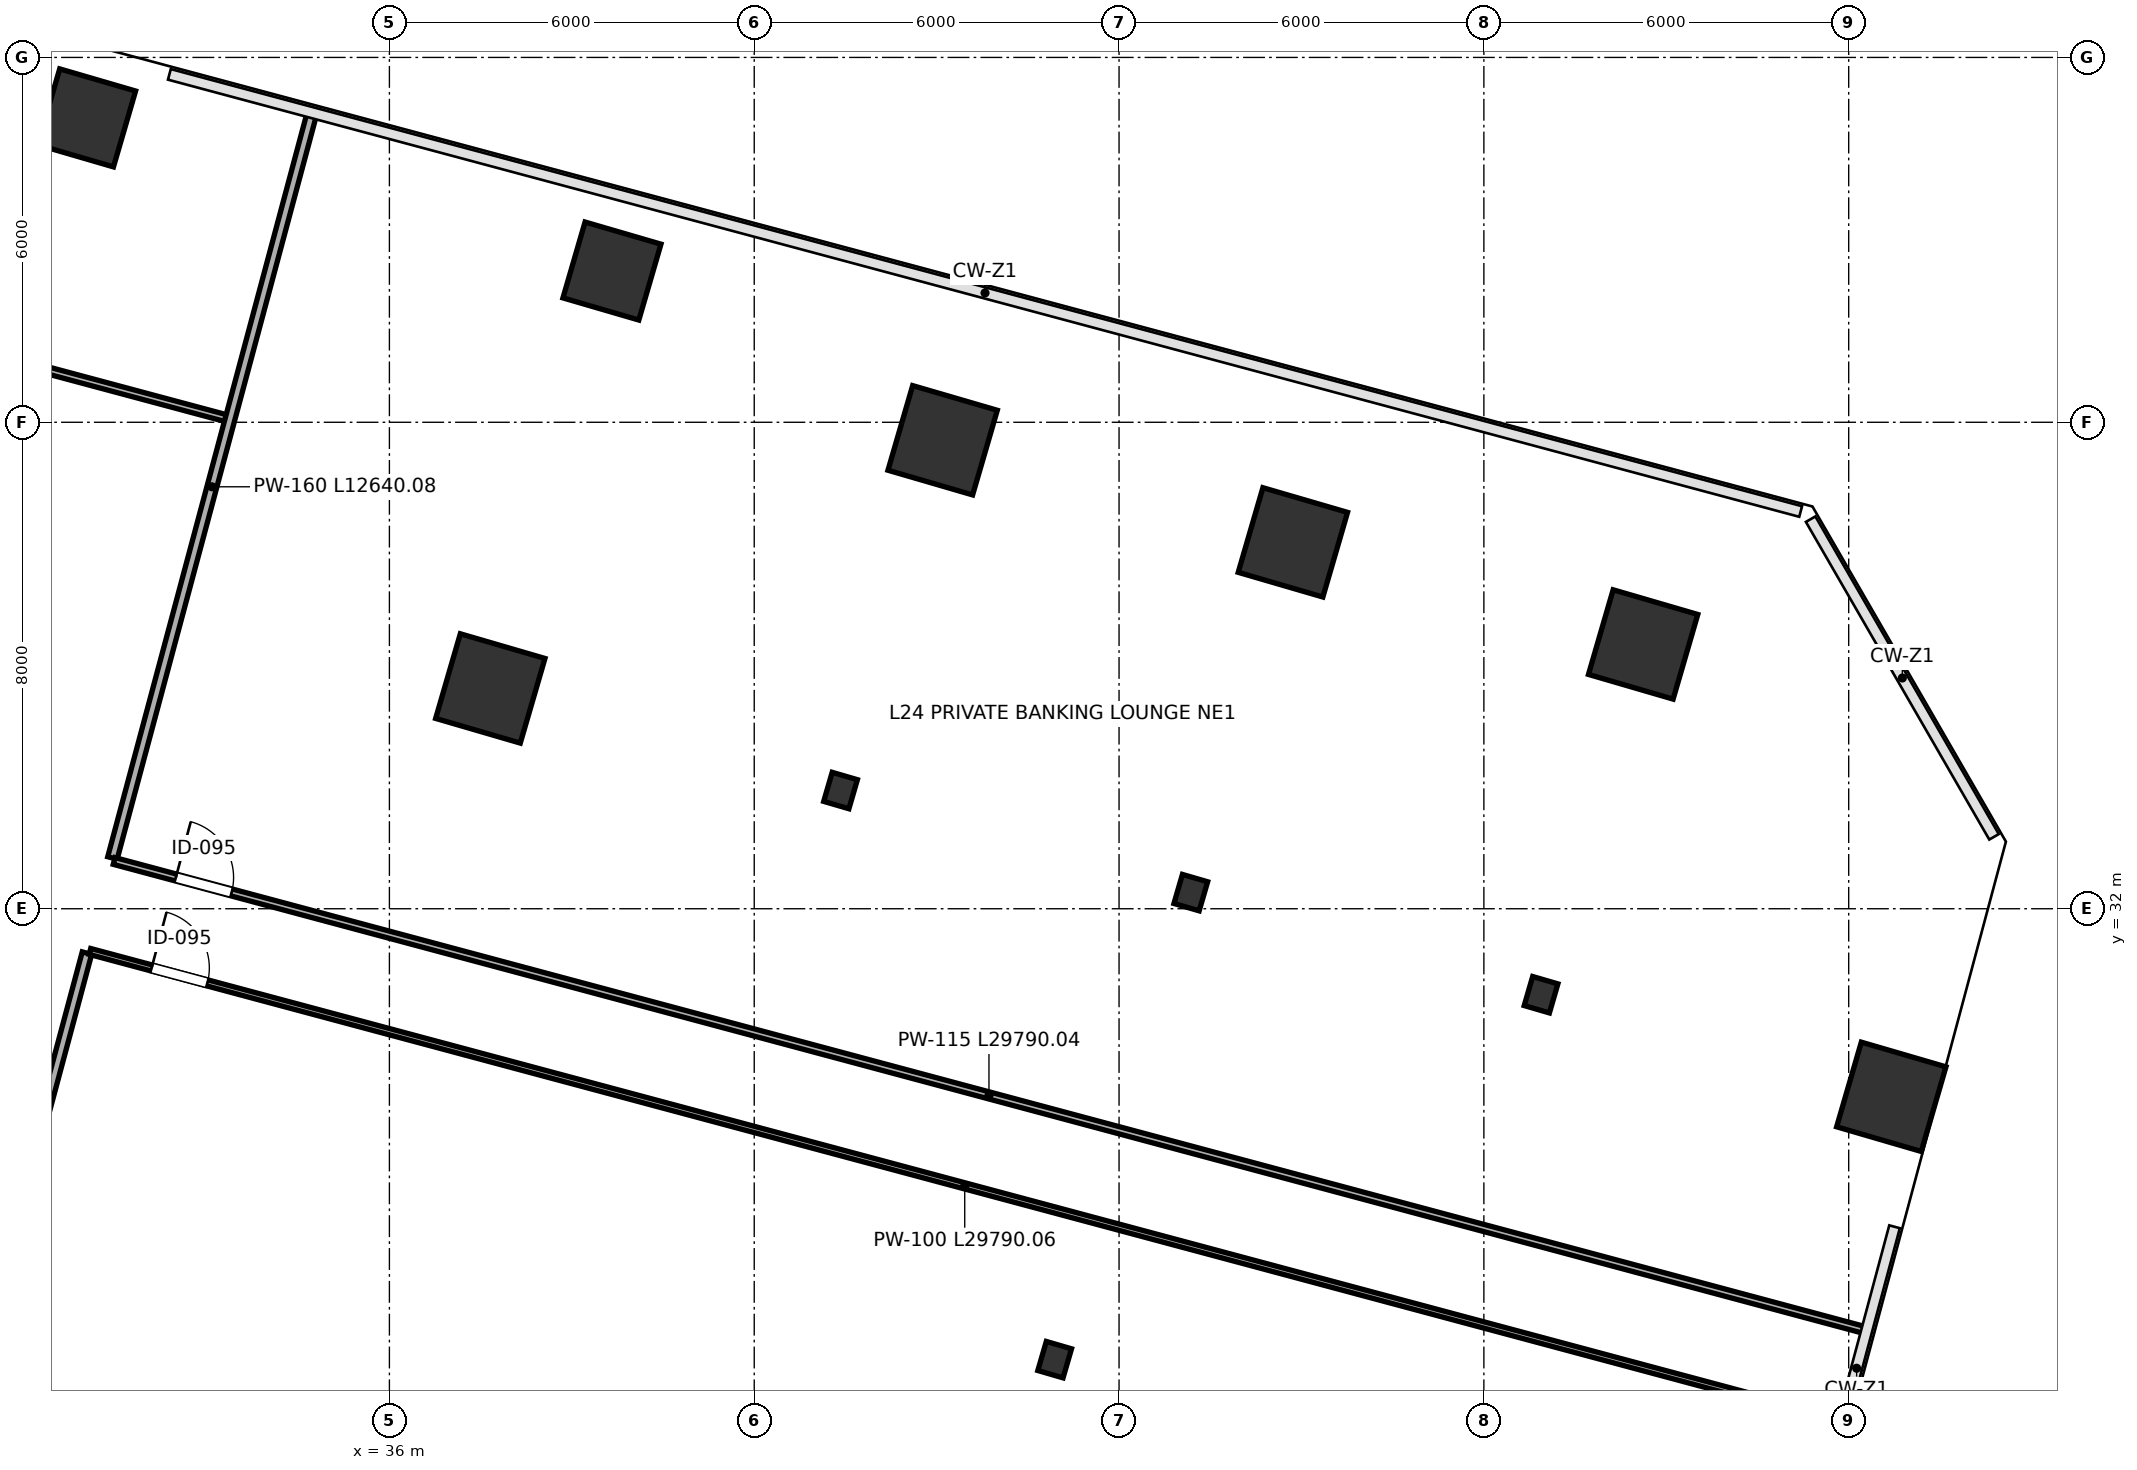
"""IFC4 building model, lengths in metres.
Left out: names, types, materials, properties, quantities, classifications, styles, units other than length and angle.
Written with IfcOpenShell. Run it as: python <this file> out.ifc"""

import sys

from ifc_helpers import new_model, si_unit, direction, frame, frame_2d, origin, origin_2d, place, context, subcontext, project, spatial, rectangle, i_section, extrude, clip, halfspace, source, transform, mapped, element, fill, save


model = new_model("IFC4")
c1 = context("Model", 3, precision=1e-05, world=origin(), true_north=direction((0.0, 1.0)))
c2 = subcontext(c1, "Body", "Model", "MODEL_VIEW")
j1 = project(units=[si_unit("LENGTHUNIT", "METRE"), si_unit("PLANEANGLEUNIT", "RADIAN")], contexts=[c1])
p1 = place(None, origin())
s1 = spatial("IfcSite", under=j1, at=p1, CompositionType="ELEMENT")
p2 = place(p1, origin())
s2 = spatial("IfcBuilding", under=s1, at=p2, CompositionType="ELEMENT")
p3 = place(p2, frame((0.0, 0.0, 108.4)))
s3 = spatial("IfcBuildingStorey", under=s2, at=p3, CompositionType="ELEMENT", Elevation=108.4)
p4 = place(p3, frame((31.02, 45.006, 0.0), z_axis=(0.066728027674, -0.04998809712, 0.996518218835), x_axis=(-0.798779681404, -0.601171101376, 0.023330826115)))
e1 = element("IfcColumn", 1, at=p4, inside=s3, PredefinedType="COLUMN", context=c2, shape_type="Clipping", body=[
    clip(clip(extrude(rectangle(XDim=1.3, YDim=1.3, at=origin_2d()), origin(), (0.0, 0.0, 1.0), 4.215), halfspace(frame((0.0, 0.0, 0.068), z_axis=(0.0, 0.0, -1.0), x_axis=(1.0, 0.0, 0.0)), False)), halfspace(frame((0.0, 0.0, 4.147), z_axis=(0.0, 0.0, 1.0), x_axis=(1.0, 0.0, 0.0)), False)),
])
p5 = place(p3, frame((37.659, 35.623, 0.0), z_axis=(0.017836984974, -0.083799082003, 0.996323017812), x_axis=(-0.997057033724, 0.072818152452, 0.02397474035)))
e2 = element("IfcColumn", 2, at=p5, inside=s3, PredefinedType="COLUMN", context=c2, shape_type="Clipping", body=[
    clip(clip(extrude(rectangle(XDim=1.45, YDim=1.45, at=origin_2d()), origin(), (0.0, 0.0, 1.0), 4.216), halfspace(frame((0.0, 0.0, 0.078), z_axis=(0.0, 0.0, -1.0), x_axis=(1.0, 0.0, 0.0)), False)), halfspace(frame((0.0, 0.0, 4.137), z_axis=(0.0, 0.0, 1.0), x_axis=(1.0, 0.0, 0.0)), False)),
])
p6 = place(p3, frame((39.66, 42.487, 0.0), z_axis=(0.053103747576, -0.094361719033, 0.994120645583), x_axis=(-0.973092241165, -0.228415060183, 0.030299347614)))
e3 = element("IfcColumn", 3, at=p6, inside=s3, PredefinedType="COLUMN", context=c2, shape_type="Clipping", body=[
    clip(clip(extrude(rectangle(XDim=1.3, YDim=1.3, at=origin_2d()), origin(), (0.0, 0.0, 1.0), 4.225), halfspace(frame((0.0, 0.0, 0.089), z_axis=(0.0, 0.0, -1.0), x_axis=(1.0, 0.0, 0.0)), False)), halfspace(frame((0.0, 0.0, 4.136), z_axis=(0.0, 0.0, 1.0), x_axis=(1.0, 0.0, 0.0)), False)),
])
p7 = place(p3, frame((43.42, 33.944, 0.0), z_axis=(0.008778031261, -0.113190403109, 0.993534538308), x_axis=(-0.978672038905, 0.20295754962, 0.031769062263)))
e4 = element("IfcColumn", 4, at=p7, inside=s3, PredefinedType="COLUMN", context=c2, shape_type="Clipping", body=[
    clip(clip(extrude(i_section(OverallWidth=0.432, OverallDepth=0.498, WebThickness=0.056, FlangeThickness=0.089, FilletRadius=0.015, at=origin_2d()), origin(), (0.0, 0.0, 1.0), 4.228), halfspace(frame((0.0, 0.0, 0.035), z_axis=(0.0, 0.0, -1.0), x_axis=(1.0, 0.0, 0.0)), False)), halfspace(frame((0.0, 0.0, 4.193), z_axis=(0.0, 0.0, 1.0), x_axis=(1.0, 0.0, 0.0)), False)),
])
p8 = place(p3, frame((45.099, 39.704, 0.0), z_axis=(0.038336503657, -0.121985025172, 0.991791291614), x_axis=(-0.999093281431, -0.023072438449, 0.035780966775)))
e5 = element("IfcColumn", 5, at=p8, inside=s3, PredefinedType="COLUMN", context=c2, shape_type="Clipping", body=[
    clip(clip(extrude(rectangle(XDim=1.45, YDim=1.45, at=origin_2d()), origin(), (0.0, 0.0, 1.0), 4.235), halfspace(frame((0.0, 0.0, 0.117), z_axis=(0.0, 0.0, -1.0), x_axis=(1.0, 0.0, 0.0)), False)), halfspace(frame((0.0, 0.0, 4.118), z_axis=(0.0, 0.0, 1.0), x_axis=(1.0, 0.0, 0.0)), False)),
])
p9 = place(p3, frame((46.941, 24.584, 0.0), z_axis=(-0.039617133974, -0.130483176723, 0.990658681529), x_axis=(-0.83810363037, 0.54417479474, 0.038158846035)))
e6 = element("IfcColumn", 6, at=p9, inside=s3, PredefinedType="COLUMN", context=c2, shape_type="Clipping", body=[
    clip(clip(extrude(i_section(OverallWidth=0.432, OverallDepth=0.498, WebThickness=0.056, FlangeThickness=0.089, FilletRadius=0.015, at=origin_2d()), origin(), (0.0, 0.0, 1.0), 4.24), halfspace(frame((0.0, 0.0, 0.042), z_axis=(0.0, 0.0, -1.0), x_axis=(1.0, 0.0, 0.0)), False)), halfspace(frame((0.0, 0.0, 4.198), z_axis=(0.0, 0.0, 1.0), x_axis=(1.0, 0.0, 0.0)), False)),
])
p10 = place(p3, frame((49.18, 32.265, 0.0), z_axis=(-0.000172602513, -0.142339538659, 0.989817875138), x_axis=(-0.959713280046, 0.278143722739, 0.039830762045)))
e7 = element("IfcColumn", 7, at=p10, inside=s3, PredefinedType="COLUMN", context=c2, shape_type="Clipping", body=[
    clip(clip(extrude(i_section(OverallWidth=0.432, OverallDepth=0.498, WebThickness=0.056, FlangeThickness=0.089, FilletRadius=0.015, at=origin_2d()), origin(), (0.0, 0.0, 1.0), 4.243), halfspace(frame((0.0, 0.0, 0.044), z_axis=(0.0, 0.0, -1.0), x_axis=(1.0, 0.0, 0.0)), False)), halfspace(frame((0.0, 0.0, 4.2), z_axis=(0.0, 0.0, 1.0), x_axis=(1.0, 0.0, 0.0)), False)),
])
p11 = place(p3, frame((50.859, 38.025, 0.0), z_axis=(0.029291516065, -0.150994893597, 0.988100475253), x_axis=(-0.995136317919, 0.088607162104, 0.043040441253)))
e8 = element("IfcColumn", 8, at=p11, inside=s3, PredefinedType="COLUMN", context=c2, shape_type="Clipping", body=[
    clip(clip(extrude(rectangle(XDim=1.45, YDim=1.45, at=origin_2d()), origin(), (0.0, 0.0, 1.0), 4.251), halfspace(frame((0.0, 0.0, 0.141), z_axis=(0.0, 0.0, -1.0), x_axis=(1.0, 0.0, 0.0)), False)), halfspace(frame((0.0, 0.0, 4.11), z_axis=(0.0, 0.0, 1.0), x_axis=(1.0, 0.0, 0.0)), False)),
])
p12 = place(p3, frame((54.94, 30.586, 0.0), z_axis=(-0.009105432119, -0.171056136735, 0.9852192087), x_axis=(-0.94403801502, 0.326335004431, 0.047934237029)))
e9 = element("IfcColumn", 9, at=p12, inside=s3, PredefinedType="COLUMN", context=c2, shape_type="Clipping", body=[
    clip(clip(extrude(i_section(OverallWidth=0.432, OverallDepth=0.498, WebThickness=0.056, FlangeThickness=0.089, FilletRadius=0.015, at=origin_2d()), origin(), (0.0, 0.0, 1.0), 4.263), halfspace(frame((0.0, 0.0, 0.053), z_axis=(0.0, 0.0, -1.0), x_axis=(1.0, 0.0, 0.0)), False)), halfspace(frame((0.0, 0.0, 4.21), z_axis=(0.0, 0.0, 1.0), x_axis=(1.0, 0.0, 0.0)), False)),
])
p13 = place(p3, frame((56.619, 36.346, 0.0), z_axis=(0.020294801599, -0.179623286263, 0.983526103395), x_axis=(-0.98487919122, 0.165693320666, 0.050583615811)))
e10 = element("IfcColumn", 10, at=p13, inside=s3, PredefinedType="COLUMN", context=c2, shape_type="Clipping", body=[
    clip(clip(extrude(rectangle(XDim=1.45, YDim=1.45, at=origin_2d()), origin(), (0.0, 0.0, 1.0), 4.271), halfspace(frame((0.0, 0.0, 0.166), z_axis=(0.0, 0.0, -1.0), x_axis=(1.0, 0.0, 0.0)), False)), halfspace(frame((0.0, 0.0, 4.104), z_axis=(0.0, 0.0, 1.0), x_axis=(1.0, 0.0, 0.0)), False)),
])
p14 = place(p3, frame((60.701, 28.907, 0.0), z_axis=(-0.017939274987, -0.199325277637, 0.979769164706), x_axis=(-0.93160934059, 0.359120820282, 0.056002437148)))
e11 = element("IfcColumn", 11, at=p14, inside=s3, PredefinedType="COLUMN", context=c2, shape_type="Clipping", body=[
    clip(clip(extrude(rectangle(XDim=1.45, YDim=1.45, at=origin_2d()), origin(), (0.0, 0.0, 1.0), 4.287), halfspace(frame((0.0, 0.0, 0.184), z_axis=(0.0, 0.0, -1.0), x_axis=(1.0, 0.0, 0.0)), False)), halfspace(frame((0.0, 0.0, 4.103), z_axis=(0.0, 0.0, 1.0), x_axis=(1.0, 0.0, 0.0)), False)),
])
p15 = place(p3, frame((8.071, 46.831, 0.0), z_axis=(0.0, 0.0, 1.0), x_axis=(0.965925848141, -0.258818963551, 0.0)))
e12 = element("IfcWall", 12, at=p15, inside=s3, PredefinedType="PARTITIONING", context=c2, shape_type="SweptSolid", body=[
    extrude(rectangle(XDim=26.16, YDim=0.115, at=frame_2d((13.08, 0.0))), origin(), (0.0, 0.0, 1.0), 3.96),
])
p16 = place(p15, frame((1.05, 0.0, 0.0)))
e13 = element("IfcOpeningElement", 13, at=p16, cuts=e12, PredefinedType="OPENING", context=c2, shape_type="SweptSolid", body=[
    extrude(rectangle(XDim=0.95, YDim=2.15, at=frame_2d((0.475, 1.075))), frame((0.0, 0.067, 0.0), z_axis=(0.0, -1.0, 0.0), x_axis=(1.0, 0.0, 0.0)), (0.0, 0.0, 1.0), 0.135),
])
p17 = place(p3, frame((31.445, 32.834, 0.0), z_axis=(0.0, 0.0, 1.0), x_axis=(0.258816538161, 0.965926498018, 0.0)))
e14 = element("IfcWall", 14, at=p17, inside=s3, PredefinedType="PARTITIONING", context=c2, shape_type="SweptSolid", body=[
    extrude(rectangle(XDim=12.64, YDim=0.16, at=frame_2d((6.32, 0.0))), origin(), (0.0, 0.0, 1.0), 3.095),
])
p18 = place(p3, frame((25.906, 12.164, 0.0), z_axis=(0.0, 0.0, 1.0), x_axis=(0.258805595447, 0.965929430013, 0.0)))
e15 = element("IfcWall", 15, at=p18, inside=s3, PredefinedType="PARTITIONING", context=c2, shape_type="SweptSolid", body=[
    extrude(rectangle(XDim=19.78, YDim=0.16, at=frame_2d((9.89, 0.0))), origin(), (0.0, 0.0, 1.0), 3.96),
])
p19 = place(p3, frame((31.473, 32.785, 0.0), z_axis=(0.0, 0.0, 1.0), x_axis=(0.965927931901, -0.258811186722, 0.0)))
e16 = element("IfcWall", 16, at=p19, inside=s3, PredefinedType="PARTITIONING", context=c2, shape_type="SweptSolid", body=[
    extrude(rectangle(XDim=29.79, YDim=0.115, at=frame_2d((14.895, 0.0))), origin(), (0.0, 0.0, 1.0), 3.095),
])
p20 = place(p19, frame((1.05, 0.0, 0.0)))
e17 = element("IfcOpeningElement", 17, at=p20, cuts=e16, PredefinedType="OPENING", context=c2, shape_type="SweptSolid", body=[
    extrude(rectangle(XDim=0.95, YDim=2.15, at=frame_2d((0.475, 1.075))), frame((0.0, 0.067, 0.0), z_axis=(0.0, -1.0, 0.0), x_axis=(1.0, 0.0, 0.0)), (0.0, 0.0, 1.0), 0.135),
])
p21 = place(p3, frame((31.074, 31.298, 0.0), z_axis=(0.0, 0.0, 1.0), x_axis=(0.96592643206, -0.258816784325, 0.0)))
e18 = element("IfcWall", 18, at=p21, inside=s3, PredefinedType="PARTITIONING", context=c2, shape_type="SweptSolid", body=[
    extrude(rectangle(XDim=29.79, YDim=0.1, at=frame_2d((14.895, 0.0))), origin(), (0.0, 0.0, 1.0), 3.095),
])
p22 = place(p21, frame((1.05, 0.0, 0.0)))
e19 = element("IfcOpeningElement", 19, at=p22, cuts=e18, PredefinedType="OPENING", context=c2, shape_type="SweptSolid", body=[
    extrude(rectangle(XDim=0.95, YDim=2.15, at=frame_2d((0.475, 1.075))), frame((0.0, 0.06, 0.0), z_axis=(0.0, -1.0, 0.0), x_axis=(1.0, 0.0, 0.0)), (0.0, 0.0, 1.0), 0.12),
])
m1 = source(origin(), c2, "Body", "SweptSolid", [
    extrude(rectangle(XDim=0.95, YDim=2.15, at=frame_2d((0.475, 1.075))), frame((0.0, 0.025, 0.0), z_axis=(0.0, -1.0, 0.0), x_axis=(1.0, 0.0, 0.0)), (0.0, 0.0, 1.0), 0.05),
])
p23 = place(p20, origin())
e20 = element("IfcDoor", 20, at=p23, inside=s3, OperationType="SINGLE_SWING_LEFT", PredefinedType="DOOR", context=c2, shape_type="MappedRepresentation", body=[
    mapped(m1, transform((0.0, 0.0, 0.0), scale=1.0)),
])
fill(e17, e20)
p24 = place(p22, origin())
e21 = element("IfcDoor", 21, at=p24, inside=s3, OperationType="SINGLE_SWING_LEFT", PredefinedType="DOOR", context=c2, shape_type="MappedRepresentation", body=[
    mapped(m1, transform((0.0, 0.0, 0.0), scale=1.0)),
])
fill(e19, e21)
save(model, sys.argv[1])
